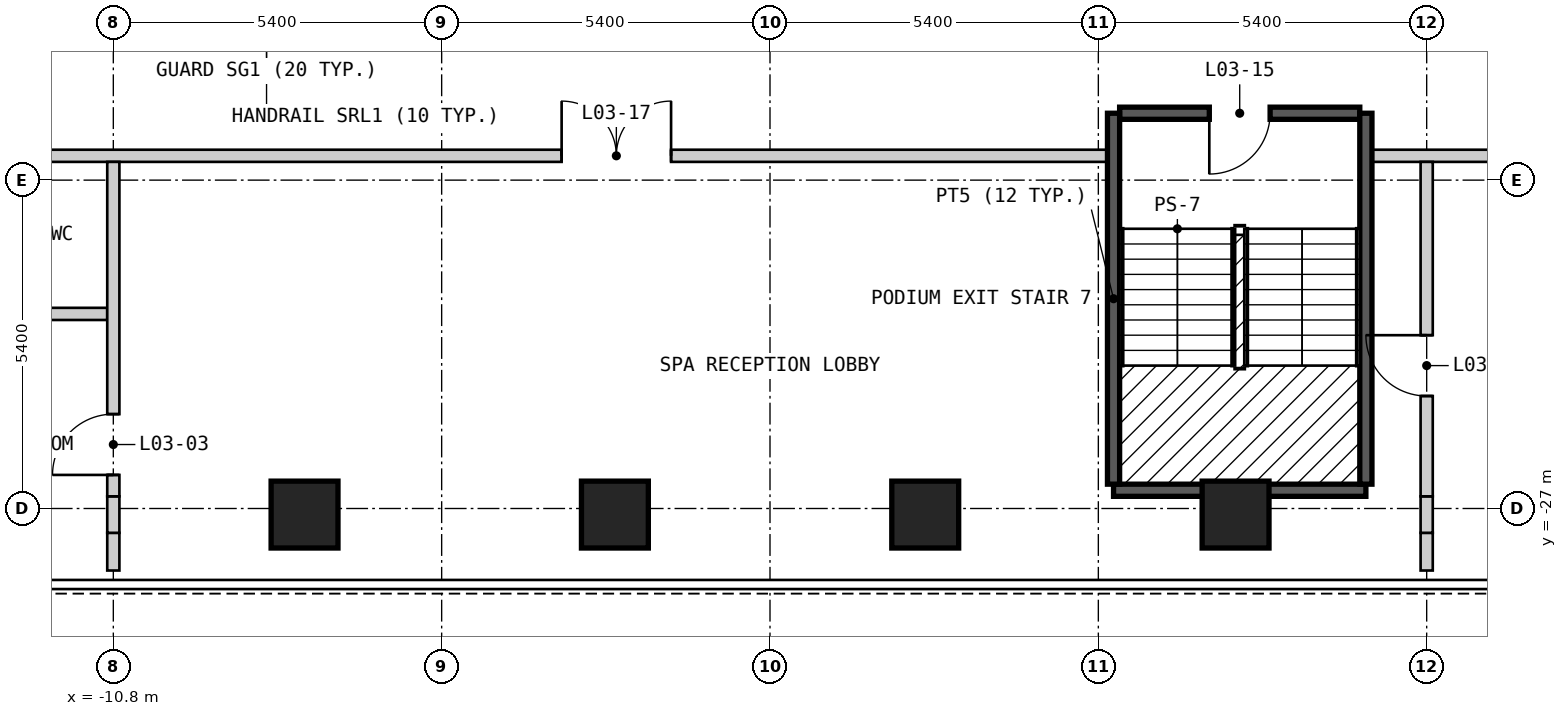
"""IFC4 building model, lengths in metres.
Left out: names, types, materials, properties, quantities, classifications, styles, units other than length and angle.
Written with IfcOpenShell. Run it as: python <this file> out.ifc"""

import sys

from ifc_helpers import new_model, si_unit, direction, frame, frame_2d, origin, origin_2d, place, context, subcontext, project, spatial, rectangle, extrude, element, fill, save


model = new_model("IFC4")
c1 = context("Model", 3, precision=1e-05, world=origin(), true_north=direction((0.0, 1.0)))
c2 = subcontext(c1, "Body", "Model", "MODEL_VIEW")
j1 = project(units=[si_unit("LENGTHUNIT", "METRE"), si_unit("PLANEANGLEUNIT", "RADIAN")], contexts=[c1])
p1 = place(None, origin())
s1 = spatial("IfcSite", under=j1, at=p1, CompositionType="ELEMENT")
p2 = place(p1, origin())
s2 = spatial("IfcBuilding", under=s1, at=p2, CompositionType="ELEMENT")
p3 = place(p2, frame((0.0, 0.0, 12.6)))
s3 = spatial("IfcBuildingStorey", under=s2, at=p3, CompositionType="ELEMENT", Elevation=12.6)
for number, where, z_axis, x_axis in (
    (1, (-7.655, -27.1, 0.0), (0.0, 0.0, 1.0), (1.0, 0.0, 0.0)),
    (2, (-2.551, -27.1, 0.0), (0.0, 0.0, 1.0), (1.0, 0.0, 0.0)),
    (3, (2.553, -27.1, 0.0), (0.0, 0.0, 1.0), (1.0, 0.0, 0.0)),
    (4, (7.657, -27.1, 0.0), (0.0, 0.0, 1.0), (1.0, 0.0, 0.0)),
):
    element("IfcColumn", number, at=place(p3, frame(where, z_axis=z_axis, x_axis=x_axis)), inside=s3, PredefinedType="COLUMN", context=c2, shape_type="SweptSolid", body=[
        extrude(rectangle(XDim=1.1, YDim=1.1, at=origin_2d()), origin(), (0.0, 0.0, 1.0), 3.6),
    ])
p4 = place(p3, frame((5.65, -26.7, 0.0), z_axis=(0.0, 0.0, 1.0), x_axis=(1.0, 0.0, 0.0)))
e5 = element("IfcWall", 5, at=p4, inside=s3, PredefinedType="SOLIDWALL", context=c2, shape_type="SweptSolid", body=[
    extrude(rectangle(XDim=4.15, YDim=0.2, at=frame_2d((2.075, 0.0))), origin(), (0.0, 0.0, 1.0), 3.25),
])
p5 = place(p3, frame((-14.5, -23.8, 0.0), z_axis=(0.0, 0.0, 1.0), x_axis=(1.0, 0.0, 0.0)))
e6 = element("IfcWall", 6, at=p5, inside=s3, PredefinedType="PARTITIONING", context=c2, shape_type="SweptSolid", body=[
    extrude(rectangle(XDim=3.6, YDim=0.2, at=frame_2d((1.8, 0.0))), origin(), (0.0, 0.0, 1.0), 3.25),
])
p6 = place(p3, frame((-18.35, -21.2, 0.0), z_axis=(0.0, 0.0, 1.0), x_axis=(1.0, 0.0, 0.0)))
e7 = element("IfcWall", 7, at=p6, inside=s3, PredefinedType="PARTITIONING", context=c2, shape_type="SweptSolid", body=[
    extrude(rectangle(XDim=24.1, YDim=0.2, at=frame_2d((12.05, 0.0))), origin(), (0.0, 0.0, 1.0), 3.25),
])
p7 = place(p6, frame((2.277, 0.0, 0.0), z_axis=(0.0, 0.0, 1.0), x_axis=(-1.0, 0.0, 0.0)))
e8 = element("IfcOpeningElement", 8, at=p7, cuts=e7, PredefinedType="OPENING", context=c2, shape_type="SweptSolid", body=[
    extrude(rectangle(XDim=0.9, YDim=2.1, at=frame_2d((0.45, 1.05))), frame((0.0, 0.11, 0.0), z_axis=(0.0, -1.0, 0.0), x_axis=(1.0, 0.0, 0.0)), (0.0, 0.0, 1.0), 0.22),
])
p8 = place(p6, frame((6.15, 0.0, 0.0), z_axis=(0.0, 0.0, 1.0), x_axis=(-1.0, 0.0, 0.0)))
e9 = element("IfcOpeningElement", 9, at=p8, cuts=e7, PredefinedType="OPENING", context=c2, shape_type="SweptSolid", body=[
    extrude(rectangle(XDim=1.0, YDim=2.1, at=frame_2d((0.5, 1.05))), frame((0.0, 0.11, 0.0), z_axis=(0.0, -1.0, 0.0), x_axis=(1.0, 0.0, 0.0)), (0.0, 0.0, 1.0), 0.22),
])
p9 = place(p6, frame((14.923, 0.0, 0.0)))
e10 = element("IfcOpeningElement", 10, at=p9, cuts=e7, PredefinedType="OPENING", context=c2, shape_type="SweptSolid", body=[
    extrude(rectangle(XDim=1.8, YDim=2.1, at=frame_2d((0.9, 1.05))), frame((0.0, 0.11, 0.0), z_axis=(0.0, -1.0, 0.0), x_axis=(1.0, 0.0, 0.0)), (0.0, 0.0, 1.0), 0.22),
])
p10 = place(p3, frame((9.7, -21.2, 0.0), z_axis=(0.0, 0.0, 1.0), x_axis=(1.0, 0.0, 0.0)))
e11 = element("IfcWall", 11, at=p10, inside=s3, PredefinedType="PARTITIONING", context=c2, shape_type="SweptSolid", body=[
    extrude(rectangle(XDim=5.7, YDim=0.2, at=frame_2d((2.85, 0.0))), origin(), (0.0, 0.0, 1.0), 3.25),
])
p11 = place(p3, frame((5.75, -20.5, 0.0), z_axis=(0.0, 0.0, 1.0), x_axis=(1.0, 0.0, 0.0)))
e12 = element("IfcWall", 12, at=p11, inside=s3, PredefinedType="SOLIDWALL", context=c2, shape_type="SweptSolid", body=[
    extrude(rectangle(XDim=3.95, YDim=0.2, at=frame_2d((1.975, 0.0))), origin(), (0.0, 0.0, 1.0), 3.25),
])
p12 = place(p11, frame((2.475, 0.0, 0.0), z_axis=(0.0, 0.0, 1.0), x_axis=(-1.0, 0.0, 0.0)))
e13 = element("IfcOpeningElement", 13, at=p12, cuts=e12, PredefinedType="OPENING", context=c2, shape_type="SweptSolid", body=[
    extrude(rectangle(XDim=1.0, YDim=2.1, at=frame_2d((0.5, 1.05))), frame((0.0, 0.11, 0.0), z_axis=(0.0, -1.0, 0.0), x_axis=(1.0, 0.0, 0.0)), (0.0, 0.0, 1.0), 0.22),
])
p13 = place(p3, frame((-10.8, -28.02, 0.0), z_axis=(0.0, 0.0, 1.0), x_axis=(0.0, 1.0, 0.0)))
e14 = element("IfcWall", 14, at=p13, inside=s3, PredefinedType="PARTITIONING", context=c2, shape_type="SweptSolid", body=[
    extrude(rectangle(XDim=0.62, YDim=0.2, at=frame_2d((0.31, 0.0))), origin(), (0.0, 0.0, 1.0), 3.25),
])
p14 = place(p3, frame((-10.8, -27.4, 0.0), z_axis=(0.0, 0.0, 1.0), x_axis=(0.0, 1.0, 0.0)))
e15 = element("IfcWall", 15, at=p14, inside=s3, PredefinedType="PARTITIONING", context=c2, shape_type="SweptSolid", body=[
    extrude(rectangle(XDim=0.6, YDim=0.2, at=frame_2d((0.3, 0.0))), origin(), (0.0, 0.0, 1.0), 2.52),
])
p15 = place(p3, frame((-10.8, -26.8, 0.0), z_axis=(0.0, 0.0, 1.0), x_axis=(0.0, 1.0, 0.0)))
e16 = element("IfcWall", 16, at=p15, inside=s3, PredefinedType="PARTITIONING", context=c2, shape_type="SweptSolid", body=[
    extrude(rectangle(XDim=5.5, YDim=0.2, at=frame_2d((2.75, 0.0))), origin(), (0.0, 0.0, 1.0), 3.25),
])
p16 = place(p15, frame((0.352, 0.0, 0.0)))
e17 = element("IfcOpeningElement", 17, at=p16, cuts=e16, PredefinedType="OPENING", context=c2, shape_type="SweptSolid", body=[
    extrude(rectangle(XDim=1.0, YDim=2.1, at=frame_2d((0.5, 1.05))), frame((0.0, 0.11, 0.0), z_axis=(0.0, -1.0, 0.0), x_axis=(1.0, 0.0, 0.0)), (0.0, 0.0, 1.0), 0.22),
])
for number, where, z_axis, x_axis in (
    (18, (5.65, -26.6, 0.0), (0.0, 0.0, 1.0), (0.0, 1.0, 0.0)),
    (19, (9.8, -26.6, 0.0), (0.0, 0.0, 1.0), (0.0, 1.0, 0.0)),
):
    element("IfcWall", number, at=place(p3, frame(where, z_axis=z_axis, x_axis=x_axis)), inside=s3, PredefinedType="SOLIDWALL", context=c2, shape_type="SweptSolid", body=[
        extrude(rectangle(XDim=6.1, YDim=0.2, at=frame_2d((3.05, 0.0))), origin(), (0.0, 0.0, 1.0), 3.25),
    ])
p17 = place(p3, frame((10.8, -28.02, 0.0), z_axis=(0.0, 0.0, 1.0), x_axis=(0.0, 1.0, 0.0)))
e20 = element("IfcWall", 20, at=p17, inside=s3, PredefinedType="PARTITIONING", context=c2, shape_type="SweptSolid", body=[
    extrude(rectangle(XDim=0.62, YDim=0.2, at=frame_2d((0.31, 0.0))), origin(), (0.0, 0.0, 1.0), 3.25),
])
p18 = place(p3, frame((10.8, -27.4, 0.0), z_axis=(0.0, 0.0, 1.0), x_axis=(0.0, 1.0, 0.0)))
e21 = element("IfcWall", 21, at=p18, inside=s3, PredefinedType="PARTITIONING", context=c2, shape_type="SweptSolid", body=[
    extrude(rectangle(XDim=0.6, YDim=0.2, at=frame_2d((0.3, 0.0))), origin(), (0.0, 0.0, 1.0), 2.52),
])
p19 = place(p3, frame((10.8, -26.8, 0.0), z_axis=(0.0, 0.0, 1.0), x_axis=(0.0, 1.0, 0.0)))
e22 = element("IfcWall", 22, at=p19, inside=s3, PredefinedType="PARTITIONING", context=c2, shape_type="SweptSolid", body=[
    extrude(rectangle(XDim=5.5, YDim=0.2, at=frame_2d((2.75, 0.0))), origin(), (0.0, 0.0, 1.0), 3.25),
])
p20 = place(p19, frame((2.65, 0.0, 0.0), z_axis=(0.0, 0.0, 1.0), x_axis=(-1.0, 0.0, 0.0)))
e23 = element("IfcOpeningElement", 23, at=p20, cuts=e22, PredefinedType="OPENING", context=c2, shape_type="SweptSolid", body=[
    extrude(rectangle(XDim=1.0, YDim=2.1, at=frame_2d((0.5, 1.05))), frame((0.0, 0.11, 0.0), z_axis=(0.0, -1.0, 0.0), x_axis=(1.0, 0.0, 0.0)), (0.0, 0.0, 1.0), 0.22),
])
p21 = place(p16, origin())
e24 = element("IfcDoor", 24, at=p21, inside=s3, OperationType="SINGLE_SWING_LEFT", PredefinedType="DOOR", context=c2, shape_type="SweptSolid", body=[
    extrude(rectangle(XDim=1.0, YDim=2.1, at=frame_2d((0.5, 1.05))), frame((0.0, 0.025, 0.0), z_axis=(0.0, -1.0, 0.0), x_axis=(1.0, 0.0, 0.0)), (0.0, 0.0, 1.0), 0.05),
])
fill(e17, e24)
p22 = place(p20, origin())
e25 = element("IfcDoor", 25, at=p22, inside=s3, OperationType="SINGLE_SWING_LEFT", PredefinedType="DOOR", context=c2, shape_type="SweptSolid", body=[
    extrude(rectangle(XDim=1.0, YDim=2.1, at=frame_2d((0.5, 1.05))), frame((0.0, 0.025, 0.0), z_axis=(0.0, -1.0, 0.0), x_axis=(1.0, 0.0, 0.0)), (0.0, 0.0, 1.0), 0.05),
])
fill(e23, e25)
p23 = place(p12, origin())
e26 = element("IfcDoor", 26, at=p23, inside=s3, OperationType="SINGLE_SWING_RIGHT", PredefinedType="DOOR", context=c2, shape_type="SweptSolid", body=[
    extrude(rectangle(XDim=1.0, YDim=2.1, at=frame_2d((0.5, 1.05))), frame((0.0, 0.025, 0.0), z_axis=(0.0, -1.0, 0.0), x_axis=(1.0, 0.0, 0.0)), (0.0, 0.0, 1.0), 0.05),
])
fill(e13, e26)
p24 = place(p9, origin())
e27 = element("IfcDoor", 27, at=p24, inside=s3, OperationType="DOUBLE_DOOR_SINGLE_SWING", PredefinedType="DOOR", context=c2, shape_type="SweptSolid", body=[
    extrude(rectangle(XDim=1.8, YDim=2.1, at=frame_2d((0.9, 1.05))), frame((0.0, 0.025, 0.0), z_axis=(0.0, -1.0, 0.0), x_axis=(1.0, 0.0, 0.0)), (0.0, 0.0, 1.0), 0.05),
])
fill(e10, e27)
save(model, sys.argv[1])
